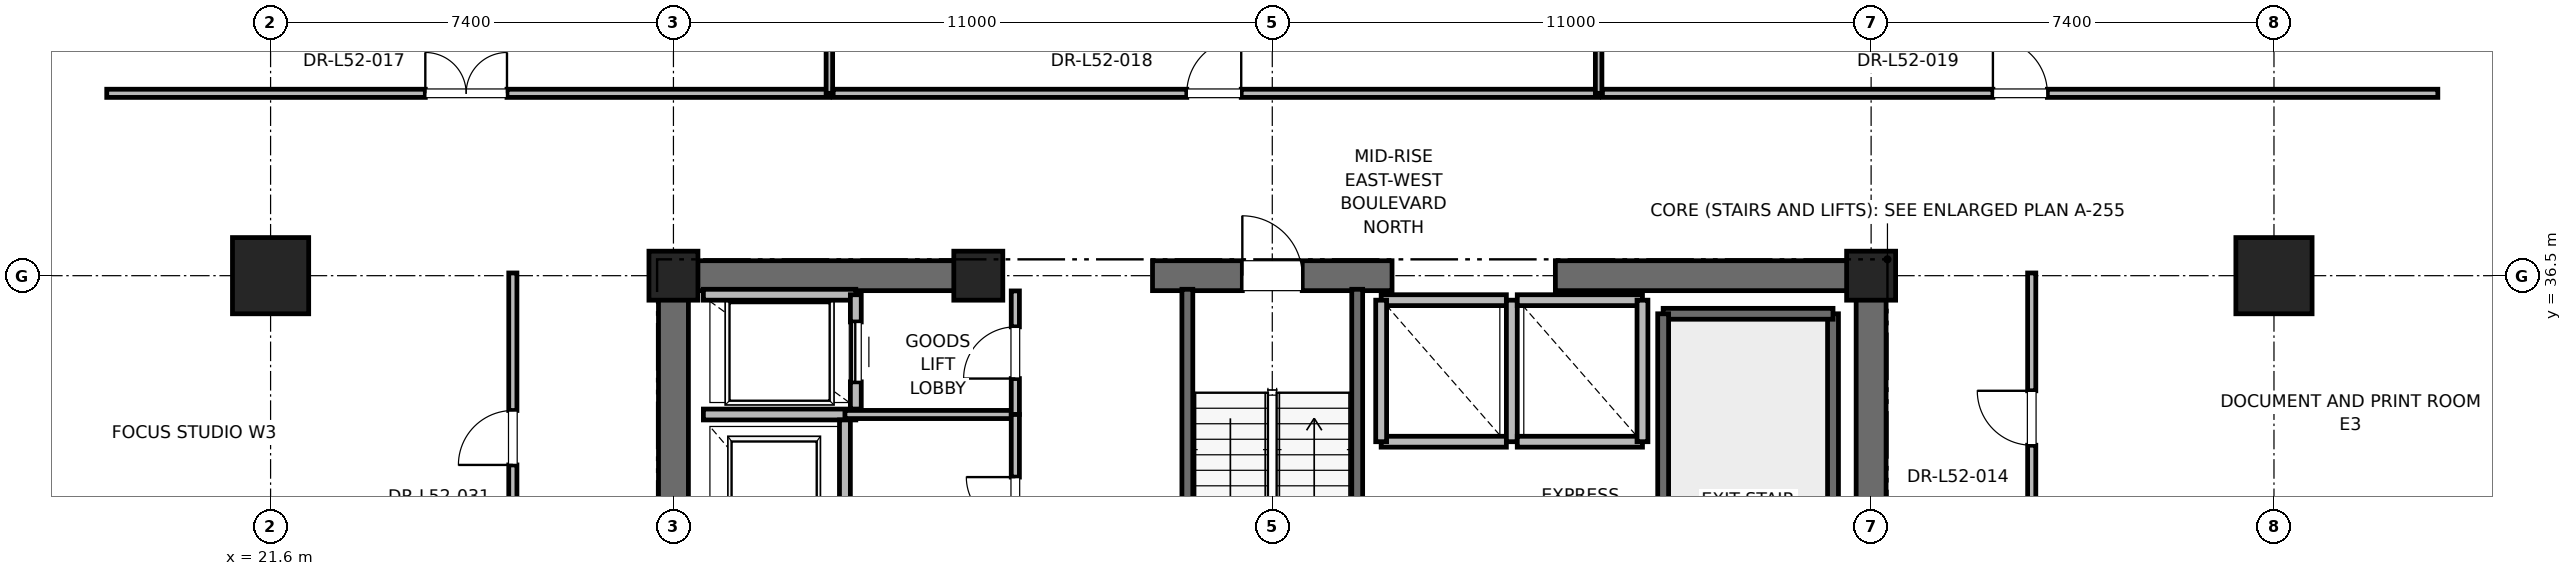
"""IFC4 building model, lengths in metres.
Left out: names, types, materials, properties, quantities, classifications, styles, units other than length and angle.
Written with IfcOpenShell. Run it as: python <this file> out.ifc"""

import sys

from ifc_helpers import new_model, si_unit, direction, frame, frame_2d, origin, origin_2d, place, context, subcontext, project, spatial, rectangle, extrude, element, fill, save


model = new_model("IFC4")
c1 = context("Model", 3, precision=1e-05, world=origin(), true_north=direction((0.0, 1.0)))
c2 = subcontext(c1, "Body", "Model", "MODEL_VIEW")
j1 = project(units=[si_unit("LENGTHUNIT", "METRE"), si_unit("PLANEANGLEUNIT", "RADIAN")], contexts=[c1])
p1 = place(None, origin())
s1 = spatial("IfcSite", under=j1, at=p1, CompositionType="ELEMENT")
p2 = place(p1, origin())
s2 = spatial("IfcBuilding", under=s1, at=p2, CompositionType="ELEMENT")
p3 = place(p2, frame((0.0, 0.0, 225.2)))
s3 = spatial("IfcBuildingStorey", under=s2, at=p3, CompositionType="ELEMENT", Elevation=225.2)
for number, where, z_axis, x_axis in (
    (1, (21.6, 36.5, 0.0), (0.0, 0.0, 1.0), (1.0, 0.0, 0.0)),
    (2, (58.4, 36.5, 0.0), (0.0, 0.0, 1.0), (1.0, 0.0, 0.0)),
):
    element("IfcColumn", number, at=place(p3, frame(where, z_axis=z_axis, x_axis=x_axis)), inside=s3, PredefinedType="COLUMN", context=c2, shape_type="SweptSolid", body=[
        extrude(rectangle(XDim=1.4, YDim=1.4, at=origin_2d()), origin(), (0.0, 0.0, 1.0), 4.0),
    ])
for number, where, z_axis, x_axis in (
    (3, (29.0, 36.5, 0.0), (0.0, 0.0, 1.0), (1.0, 0.0, 0.0)),
    (4, (51.0, 36.5, 0.0), (0.0, 0.0, 1.0), (1.0, 0.0, 0.0)),
    (5, (34.6, 36.5, 0.0), (0.0, 0.0, 1.0), (1.0, 0.0, 0.0)),
):
    element("IfcColumn", number, at=place(p3, frame(where, z_axis=z_axis, x_axis=x_axis)), inside=s3, PredefinedType="PILASTER", context=c2, shape_type="SweptSolid", body=[
        extrude(rectangle(XDim=0.9, YDim=0.9, at=origin_2d()), origin(), (0.0, 0.0, 1.0), 4.0),
    ])
p4 = place(p3, frame((29.0, 36.5, 0.0), z_axis=(0.0, 0.0, 1.0), x_axis=(1.0, 0.0, 0.0)))
e6 = element("IfcWall", 6, at=p4, inside=s3, PredefinedType="SHEAR", context=c2, shape_type="SweptSolid", body=[
    extrude(rectangle(XDim=5.8, YDim=0.55, at=frame_2d((2.9, 0.0))), origin(), (0.0, 0.0, 1.0), 3.775),
])
p5 = place(p3, frame((37.8, 36.5, 0.0), z_axis=(0.0, 0.0, 1.0), x_axis=(1.0, 0.0, 0.0)))
e7 = element("IfcWall", 7, at=p5, inside=s3, PredefinedType="SHEAR", context=c2, shape_type="SweptSolid", body=[
    extrude(rectangle(XDim=4.4, YDim=0.55, at=frame_2d((2.2, 0.0))), origin(), (0.0, 0.0, 1.0), 3.775),
])
p6 = place(p5, frame((1.65, 0.0, 0.0)))
e8 = element("IfcOpeningElement", 8, at=p6, cuts=e7, PredefinedType="OPENING", context=c2, shape_type="SweptSolid", body=[
    extrude(rectangle(XDim=1.1, YDim=2.15, at=frame_2d((0.55, 1.075))), frame((0.0, 0.275, 0.0), z_axis=(0.0, -1.0, 0.0), x_axis=(1.0, 0.0, 0.0)), (0.0, 0.0, 1.0), 0.55),
])
for number, where, z_axis, x_axis in (
    (9, (45.2, 36.5, 0.0), (0.0, 0.0, 1.0), (1.0, 0.0, 0.0)),
    (10, (29.0, 30.7, 0.0), (0.0, 0.0, 1.0), (0.0, 1.0, 0.0)),
):
    element("IfcWall", number, at=place(p3, frame(where, z_axis=z_axis, x_axis=x_axis)), inside=s3, PredefinedType="SHEAR", context=c2, shape_type="SweptSolid", body=[
        extrude(rectangle(XDim=5.8, YDim=0.55, at=frame_2d((2.9, 0.0))), origin(), (0.0, 0.0, 1.0), 3.775),
    ])
p7 = place(p3, frame((51.0, 27.7, 0.0), z_axis=(0.0, 0.0, 1.0), x_axis=(0.0, 1.0, 0.0)))
e11 = element("IfcWall", 11, at=p7, inside=s3, PredefinedType="SHEAR", context=c2, shape_type="SweptSolid", body=[
    extrude(rectangle(XDim=8.8, YDim=0.55, at=frame_2d((4.4, 0.0))), origin(), (0.0, 0.0, 1.0), 3.775),
])
p8 = place(p3, frame((50.3, 27.65, 0.0), z_axis=(0.0, 0.0, 1.0), x_axis=(0.0, 1.0, 0.0)))
e12 = element("IfcWall", 12, at=p8, inside=s3, PredefinedType="SOLIDWALL", context=c2, shape_type="SweptSolid", body=[
    extrude(rectangle(XDim=8.15, YDim=0.2, at=frame_2d((4.075, 0.0))), origin(), (0.0, 0.0, 1.0), 3.775),
])
p9 = place(p3, frame((47.18, 35.8, 0.0), z_axis=(0.0, 0.0, 1.0), x_axis=(1.0, 0.0, 0.0)))
e13 = element("IfcWall", 13, at=p9, inside=s3, PredefinedType="SOLIDWALL", context=c2, shape_type="SweptSolid", body=[
    extrude(rectangle(XDim=3.12, YDim=0.2, at=frame_2d((1.56, 0.0))), origin(), (0.0, 0.0, 1.0), 3.775),
])
p10 = place(p3, frame((47.18, 27.62, 0.0), z_axis=(0.0, 0.0, 1.0), x_axis=(0.0, 1.0, 0.0)))
e14 = element("IfcWall", 14, at=p10, inside=s3, PredefinedType="SOLIDWALL", context=c2, shape_type="SweptSolid", body=[
    extrude(rectangle(XDim=8.18, YDim=0.2, at=frame_2d((4.09, 0.0))), origin(), (0.0, 0.0, 1.0), 3.775),
])
p11 = place(p3, frame((38.44, 27.38, 0.0), z_axis=(0.0, 0.0, 1.0), x_axis=(0.0, 1.0, 0.0)))
e15 = element("IfcWall", 15, at=p11, inside=s3, PredefinedType="SOLIDWALL", context=c2, shape_type="SweptSolid", body=[
    extrude(rectangle(XDim=8.87, YDim=0.2, at=frame_2d((4.435, 0.0))), origin(), (0.0, 0.0, 1.0), 3.775),
])
p12 = place(p3, frame((41.56, 27.68, 0.0), z_axis=(0.0, 0.0, 1.0), x_axis=(0.0, 1.0, 0.0)))
e16 = element("IfcWall", 16, at=p12, inside=s3, PredefinedType="SOLIDWALL", context=c2, shape_type="SweptSolid", body=[
    extrude(rectangle(XDim=8.57, YDim=0.2, at=frame_2d((4.285, 0.0))), origin(), (0.0, 0.0, 1.0), 3.775),
])
p13 = place(p3, frame((29.55, 33.95, 0.0), z_axis=(0.0, 0.0, 1.0), x_axis=(1.0, 0.0, 0.0)))
e17 = element("IfcWall", 17, at=p13, inside=s3, PredefinedType="SOLIDWALL", context=c2, shape_type="SweptSolid", body=[
    extrude(rectangle(XDim=2.8, YDim=0.2, at=frame_2d((1.4, 0.0))), origin(), (0.0, 0.0, 1.0), 3.775),
])
p14 = place(p3, frame((32.15, 30.85, 0.0), z_axis=(0.0, 0.0, 1.0), x_axis=(0.0, 1.0, 0.0)))
e18 = element("IfcWall", 18, at=p14, inside=s3, PredefinedType="SOLIDWALL", context=c2, shape_type="SweptSolid", body=[
    extrude(rectangle(XDim=3.0, YDim=0.2, at=frame_2d((1.5, 0.0))), origin(), (0.0, 0.0, 1.0), 3.775),
])
p15 = place(p3, frame((32.35, 36.15, 0.0), z_axis=(0.0, 0.0, 1.0), x_axis=(-1.0, 0.0, 0.0)))
e19 = element("IfcWall", 19, at=p15, inside=s3, PredefinedType="SOLIDWALL", context=c2, shape_type="SweptSolid", body=[
    extrude(rectangle(XDim=2.8, YDim=0.2, at=frame_2d((1.4, 0.0))), origin(), (0.0, 0.0, 1.0), 3.062),
])
p16 = place(p3, frame((32.35, 34.05, 0.0), z_axis=(0.0, 0.0, 1.0), x_axis=(0.0, 1.0, 0.0)))
e20 = element("IfcWall", 20, at=p16, inside=s3, PredefinedType="SOLIDWALL", context=c2, shape_type="SweptSolid", body=[
    extrude(rectangle(XDim=2.1, YDim=0.2, at=frame_2d((1.05, 0.0))), origin(), (0.0, 0.0, 1.0), 3.775),
])
p17 = place(p16, frame((0.5, 0.0, 0.0)))
e21 = element("IfcOpeningElement", 21, at=p17, cuts=e20, PredefinedType="OPENING", context=c2, shape_type="SweptSolid", body=[
    extrude(rectangle(XDim=1.1, YDim=2.2, at=frame_2d((0.55, 1.1))), frame((0.0, 0.1, 0.0), z_axis=(0.0, -1.0, 0.0), x_axis=(1.0, 0.0, 0.0)), (0.0, 0.0, 1.0), 0.2),
])
p18 = place(p3, frame((42.0, 33.45, 0.0), z_axis=(0.0, 0.0, 1.0), x_axis=(1.0, 0.0, 0.0)))
e22 = element("IfcWall", 22, at=p18, inside=s3, PredefinedType="SOLIDWALL", context=c2, shape_type="SweptSolid", body=[
    extrude(rectangle(XDim=2.3, YDim=0.2, at=frame_2d((1.15, 0.0))), origin(), (0.0, 0.0, 1.0), 3.775),
])
p19 = place(p3, frame((44.3, 36.05, 0.0), z_axis=(0.0, 0.0, 1.0), x_axis=(-1.0, 0.0, 0.0)))
e23 = element("IfcWall", 23, at=p19, inside=s3, PredefinedType="SOLIDWALL", context=c2, shape_type="SweptSolid", body=[
    extrude(rectangle(XDim=2.3, YDim=0.2, at=frame_2d((1.15, 0.0))), origin(), (0.0, 0.0, 1.0), 2.755),
])
for number, where, z_axis, x_axis in (
    (24, (42.0, 36.05, 0.0), (0.0, 0.0, 1.0), (0.0, -1.0, 0.0)),
    (25, (44.4, 33.45, 0.0), (0.0, 0.0, 1.0), (0.0, 1.0, 0.0)),
):
    element("IfcWall", number, at=place(p3, frame(where, z_axis=z_axis, x_axis=x_axis)), inside=s3, PredefinedType="SOLIDWALL", context=c2, shape_type="SweptSolid", body=[
        extrude(rectangle(XDim=2.6, YDim=0.2, at=frame_2d((1.3, 0.0))), origin(), (0.0, 0.0, 1.0), 2.755),
    ])
p20 = place(p3, frame((44.5, 33.45, 0.0), z_axis=(0.0, 0.0, 1.0), x_axis=(1.0, 0.0, 0.0)))
e26 = element("IfcWall", 26, at=p20, inside=s3, PredefinedType="SOLIDWALL", context=c2, shape_type="SweptSolid", body=[
    extrude(rectangle(XDim=2.3, YDim=0.2, at=frame_2d((1.15, 0.0))), origin(), (0.0, 0.0, 1.0), 3.775),
])
p21 = place(p3, frame((46.8, 36.05, 0.0), z_axis=(0.0, 0.0, 1.0), x_axis=(-1.0, 0.0, 0.0)))
e27 = element("IfcWall", 27, at=p21, inside=s3, PredefinedType="SOLIDWALL", context=c2, shape_type="SweptSolid", body=[
    extrude(rectangle(XDim=2.3, YDim=0.2, at=frame_2d((1.15, 0.0))), origin(), (0.0, 0.0, 1.0), 2.755),
])
p22 = place(p3, frame((46.8, 33.45, 0.0), z_axis=(0.0, 0.0, 1.0), x_axis=(0.0, 1.0, 0.0)))
e28 = element("IfcWall", 28, at=p22, inside=s3, PredefinedType="SOLIDWALL", context=c2, shape_type="SweptSolid", body=[
    extrude(rectangle(XDim=2.6, YDim=0.2, at=frame_2d((1.3, 0.0))), origin(), (0.0, 0.0, 1.0), 3.775),
])
p23 = place(p3, frame((32.15, 33.95, 0.0), z_axis=(0.0, 0.0, 1.0), x_axis=(1.0, 0.0, 0.0)))
e29 = element("IfcWall", 29, at=p23, inside=s3, PredefinedType="PARTITIONING", context=c2, shape_type="SweptSolid", body=[
    extrude(rectangle(XDim=3.13, YDim=0.15, at=frame_2d((1.565, 0.0))), origin(), (0.0, 0.0, 1.0), 2.85),
])
p24 = place(p3, frame((35.28, 33.95, 0.0), z_axis=(0.0, 0.0, 1.0), x_axis=(0.0, 1.0, 0.0)))
e30 = element("IfcWall", 30, at=p24, inside=s3, PredefinedType="PARTITIONING", context=c2, shape_type="SweptSolid", body=[
    extrude(rectangle(XDim=2.27, YDim=0.15, at=frame_2d((1.135, 0.0))), origin(), (0.0, 0.0, 1.0), 2.755),
])
p25 = place(p24, frame((0.66, 0.0, 0.0)))
e31 = element("IfcOpeningElement", 31, at=p25, cuts=e30, PredefinedType="OPENING", context=c2, shape_type="SweptSolid", body=[
    extrude(rectangle(XDim=0.95, YDim=2.15, at=frame_2d((0.475, 1.075))), frame((0.0, 0.075, 0.0), z_axis=(0.0, -1.0, 0.0), x_axis=(1.0, 0.0, 0.0)), (0.0, 0.0, 1.0), 0.15),
])
p26 = place(p3, frame((35.28, 30.75, 0.0), z_axis=(0.0, 0.0, 1.0), x_axis=(0.0, 1.0, 0.0)))
e32 = element("IfcWall", 32, at=p26, inside=s3, PredefinedType="PARTITIONING", context=c2, shape_type="SweptSolid", body=[
    extrude(rectangle(XDim=3.2, YDim=0.15, at=frame_2d((1.6, 0.0))), origin(), (0.0, 0.0, 1.0), 2.85),
])
p27 = place(p26, frame((1.15, 0.0, 0.0)))
e33 = element("IfcOpeningElement", 33, at=p27, cuts=e32, PredefinedType="OPENING", context=c2, shape_type="SweptSolid", body=[
    extrude(rectangle(XDim=0.9, YDim=2.1, at=frame_2d((0.45, 1.05))), frame((0.0, 0.075, 0.0), z_axis=(0.0, -1.0, 0.0), x_axis=(1.0, 0.0, 0.0)), (0.0, 0.0, 1.0), 0.15),
])
p28 = place(p3, frame((18.59, 39.85, 0.0), z_axis=(0.0, 0.0, 1.0), x_axis=(1.0, 0.0, 0.0)))
e34 = element("IfcWall", 34, at=p28, inside=s3, PredefinedType="PARTITIONING", context=c2, shape_type="SweptSolid", body=[
    extrude(rectangle(XDim=13.274, YDim=0.15, at=frame_2d((6.637, 0.0))), origin(), (0.0, 0.0, 1.0), 2.85),
])
p29 = place(p28, frame((5.852, 0.0, 0.0)))
e35 = element("IfcOpeningElement", 35, at=p29, cuts=e34, PredefinedType="OPENING", context=c2, shape_type="SweptSolid", body=[
    extrude(rectangle(XDim=1.5, YDim=2.25, at=frame_2d((0.75, 1.125))), frame((0.0, 0.075, 0.0), z_axis=(0.0, -1.0, 0.0), x_axis=(1.0, 0.0, 0.0)), (0.0, 0.0, 1.0), 0.15),
])
p30 = place(p3, frame((31.864, 39.85, 0.0), z_axis=(0.0, 0.0, 1.0), x_axis=(0.0, 1.0, 0.0)))
e36 = element("IfcWall", 36, at=p30, inside=s3, PredefinedType="PARTITIONING", context=c2, shape_type="SweptSolid", body=[
    extrude(rectangle(XDim=9.806, YDim=0.12, at=frame_2d((4.903, 0.0))), origin(), (0.0, 0.0, 1.0), 2.405),
])
p31 = place(p3, frame((31.934, 39.85, 0.0), z_axis=(0.0, 0.0, 1.0), x_axis=(1.0, 0.0, 0.0)))
e37 = element("IfcWall", 37, at=p31, inside=s3, PredefinedType="PARTITIONING", context=c2, shape_type="SweptSolid", body=[
    extrude(rectangle(XDim=14.06, YDim=0.15, at=frame_2d((7.03, 0.0))), origin(), (0.0, 0.0, 1.0), 2.85),
])
p32 = place(p31, frame((6.495, 0.0, 0.0)))
e38 = element("IfcOpeningElement", 38, at=p32, cuts=e37, PredefinedType="OPENING", context=c2, shape_type="SweptSolid", body=[
    extrude(rectangle(XDim=1.0, YDim=2.15, at=frame_2d((0.5, 1.075))), frame((0.0, 0.075, 0.0), z_axis=(0.0, -1.0, 0.0), x_axis=(1.0, 0.0, 0.0)), (0.0, 0.0, 1.0), 0.15),
])
p33 = place(p3, frame((45.995, 39.85, 0.0), z_axis=(0.0, 0.0, 1.0), x_axis=(0.0, 1.0, 0.0)))
e39 = element("IfcWall", 39, at=p33, inside=s3, PredefinedType="PARTITIONING", context=c2, shape_type="SweptSolid", body=[
    extrude(rectangle(XDim=9.806, YDim=0.12, at=frame_2d((4.903, 0.0))), origin(), (0.0, 0.0, 1.0), 2.405),
])
p34 = place(p3, frame((46.065, 39.85, 0.0), z_axis=(0.0, 0.0, 1.0), x_axis=(1.0, 0.0, 0.0)))
e40 = element("IfcWall", 40, at=p34, inside=s3, PredefinedType="PARTITIONING", context=c2, shape_type="SweptSolid", body=[
    extrude(rectangle(XDim=15.345, YDim=0.15, at=frame_2d((7.672, 0.0))), origin(), (0.0, 0.0, 1.0), 2.85),
])
p35 = place(p34, frame((7.173, 0.0, 0.0)))
e41 = element("IfcOpeningElement", 41, at=p35, cuts=e40, PredefinedType="OPENING", context=c2, shape_type="SweptSolid", body=[
    extrude(rectangle(XDim=1.0, YDim=2.15, at=frame_2d((0.5, 1.075))), frame((0.0, 0.075, 0.0), z_axis=(0.0, -1.0, 0.0), x_axis=(1.0, 0.0, 0.0)), (0.0, 0.0, 1.0), 0.15),
])
p36 = place(p3, frame((26.05, 30.647, 0.0), z_axis=(0.0, 0.0, 1.0), x_axis=(0.0, 1.0, 0.0)))
e42 = element("IfcWall", 42, at=p36, inside=s3, PredefinedType="PARTITIONING", context=c2, shape_type="SweptSolid", body=[
    extrude(rectangle(XDim=5.903, YDim=0.15, at=frame_2d((2.952, 0.0))), origin(), (0.0, 0.0, 1.0), 2.85),
])
p37 = place(p36, frame((2.376, 0.0, 0.0)))
e43 = element("IfcOpeningElement", 43, at=p37, cuts=e42, PredefinedType="OPENING", context=c2, shape_type="SweptSolid", body=[
    extrude(rectangle(XDim=1.0, YDim=2.15, at=frame_2d((0.5, 1.075))), frame((0.0, 0.075, 0.0), z_axis=(0.0, -1.0, 0.0), x_axis=(1.0, 0.0, 0.0)), (0.0, 0.0, 1.0), 0.15),
])
p38 = place(p3, frame((53.95, 31.371, 0.0), z_axis=(0.0, 0.0, 1.0), x_axis=(0.0, 1.0, 0.0)))
e44 = element("IfcWall", 44, at=p38, inside=s3, PredefinedType="PARTITIONING", context=c2, shape_type="SweptSolid", body=[
    extrude(rectangle(XDim=5.179, YDim=0.15, at=frame_2d((2.589, 0.0))), origin(), (0.0, 0.0, 1.0), 2.85),
])
p39 = place(p38, frame((2.014, 0.0, 0.0)))
e45 = element("IfcOpeningElement", 45, at=p39, cuts=e44, PredefinedType="OPENING", context=c2, shape_type="SweptSolid", body=[
    extrude(rectangle(XDim=1.0, YDim=2.15, at=frame_2d((0.5, 1.075))), frame((0.0, 0.075, 0.0), z_axis=(0.0, -1.0, 0.0), x_axis=(1.0, 0.0, 0.0)), (0.0, 0.0, 1.0), 0.15),
])
p40 = place(p6, origin())
e46 = element("IfcDoor", 46, at=p40, inside=s3, OperationType="SINGLE_SWING_LEFT", PredefinedType="DOOR", context=c2, shape_type="SweptSolid", body=[
    extrude(rectangle(XDim=1.1, YDim=2.15, at=frame_2d((0.55, 1.075))), frame((0.0, 0.025, 0.0), z_axis=(0.0, -1.0, 0.0), x_axis=(1.0, 0.0, 0.0)), (0.0, 0.0, 1.0), 0.05),
])
fill(e8, e46)
p41 = place(p17, origin())
e47 = element("IfcDoor", 47, at=p41, inside=s3, OperationType="SLIDING_TO_RIGHT", PredefinedType="DOOR", context=c2, shape_type="SweptSolid", body=[
    extrude(rectangle(XDim=1.1, YDim=2.2, at=frame_2d((0.55, 1.1))), frame((0.0, 0.025, 0.0), z_axis=(0.0, -1.0, 0.0), x_axis=(1.0, 0.0, 0.0)), (0.0, 0.0, 1.0), 0.05),
])
fill(e21, e47)
p42 = place(p25, origin())
e48 = element("IfcDoor", 48, at=p42, inside=s3, OperationType="SINGLE_SWING_LEFT", PredefinedType="DOOR", context=c2, shape_type="SweptSolid", body=[
    extrude(rectangle(XDim=0.95, YDim=2.15, at=frame_2d((0.475, 1.075))), frame((0.0, 0.025, 0.0), z_axis=(0.0, -1.0, 0.0), x_axis=(1.0, 0.0, 0.0)), (0.0, 0.0, 1.0), 0.05),
])
fill(e31, e48)
p43 = place(p27, origin())
e49 = element("IfcDoor", 49, at=p43, inside=s3, OperationType="SINGLE_SWING_RIGHT", PredefinedType="DOOR", context=c2, shape_type="SweptSolid", body=[
    extrude(rectangle(XDim=0.9, YDim=2.1, at=frame_2d((0.45, 1.05))), frame((0.0, 0.025, 0.0), z_axis=(0.0, -1.0, 0.0), x_axis=(1.0, 0.0, 0.0)), (0.0, 0.0, 1.0), 0.05),
])
fill(e33, e49)
p44 = place(p29, origin())
e50 = element("IfcDoor", 50, at=p44, inside=s3, OperationType="DOUBLE_DOOR_SINGLE_SWING", PredefinedType="DOOR", context=c2, shape_type="SweptSolid", body=[
    extrude(rectangle(XDim=1.5, YDim=2.25, at=frame_2d((0.75, 1.125))), frame((0.0, 0.025, 0.0), z_axis=(0.0, -1.0, 0.0), x_axis=(1.0, 0.0, 0.0)), (0.0, 0.0, 1.0), 0.05),
])
fill(e35, e50)
p45 = place(p32, origin())
e51 = element("IfcDoor", 51, at=p45, inside=s3, OperationType="SINGLE_SWING_RIGHT", PredefinedType="DOOR", context=c2, shape_type="SweptSolid", body=[
    extrude(rectangle(XDim=1.0, YDim=2.15, at=frame_2d((0.5, 1.075))), frame((0.0, 0.025, 0.0), z_axis=(0.0, -1.0, 0.0), x_axis=(1.0, 0.0, 0.0)), (0.0, 0.0, 1.0), 0.05),
])
fill(e38, e51)
p46 = place(p35, origin())
e52 = element("IfcDoor", 52, at=p46, inside=s3, OperationType="SINGLE_SWING_LEFT", PredefinedType="DOOR", context=c2, shape_type="SweptSolid", body=[
    extrude(rectangle(XDim=1.0, YDim=2.15, at=frame_2d((0.5, 1.075))), frame((0.0, 0.025, 0.0), z_axis=(0.0, -1.0, 0.0), x_axis=(1.0, 0.0, 0.0)), (0.0, 0.0, 1.0), 0.05),
])
fill(e41, e52)
p47 = place(p37, origin())
e53 = element("IfcDoor", 53, at=p47, inside=s3, OperationType="SINGLE_SWING_LEFT", PredefinedType="DOOR", context=c2, shape_type="SweptSolid", body=[
    extrude(rectangle(XDim=1.0, YDim=2.15, at=frame_2d((0.5, 1.075))), frame((0.0, 0.025, 0.0), z_axis=(0.0, -1.0, 0.0), x_axis=(1.0, 0.0, 0.0)), (0.0, 0.0, 1.0), 0.05),
])
fill(e43, e53)
p48 = place(p39, origin())
e54 = element("IfcDoor", 54, at=p48, inside=s3, OperationType="SINGLE_SWING_RIGHT", PredefinedType="DOOR", context=c2, shape_type="SweptSolid", body=[
    extrude(rectangle(XDim=1.0, YDim=2.15, at=frame_2d((0.5, 1.075))), frame((0.0, 0.025, 0.0), z_axis=(0.0, -1.0, 0.0), x_axis=(1.0, 0.0, 0.0)), (0.0, 0.0, 1.0), 0.05),
])
fill(e45, e54)
save(model, sys.argv[1])
